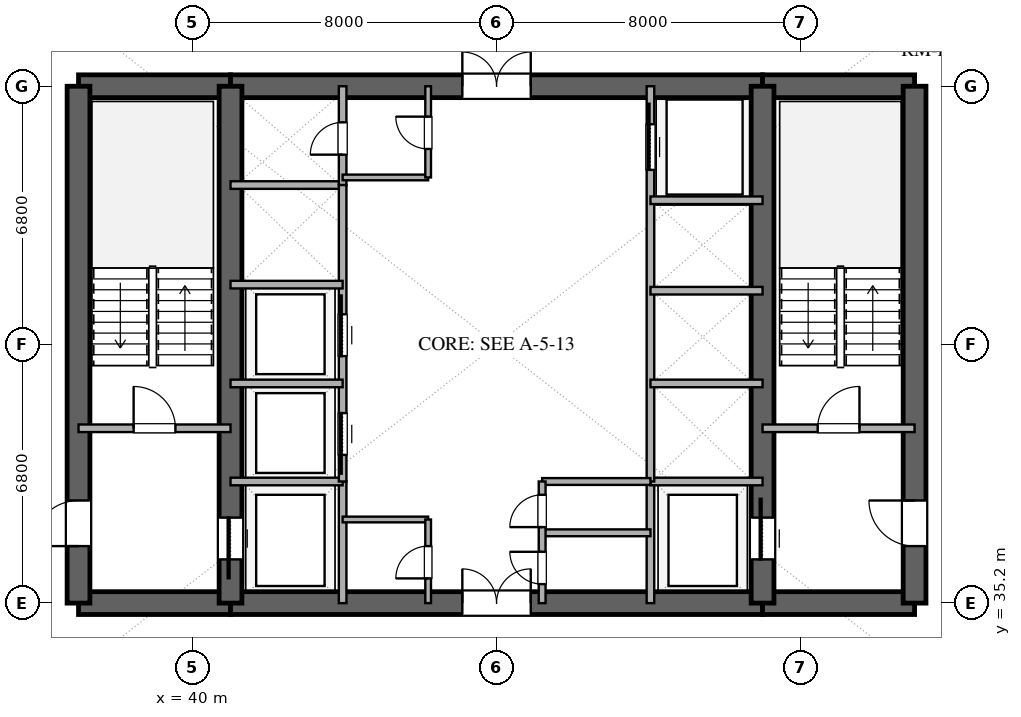
"""IFC4 building model, lengths in metres.
Left out: names, types, materials, properties, quantities, classifications, styles, units other than length and angle.
Written with IfcOpenShell. Run it as: python <this file> out.ifc"""

import sys

from ifc_helpers import new_model, si_unit, direction, frame, frame_2d, origin, place, context, subcontext, project, spatial, rectangle, extrude, element, fill, save


model = new_model("IFC4")
c1 = context("Model", 3, precision=1e-05, world=origin(), true_north=direction((0.0, 1.0)))
c2 = subcontext(c1, "Body", "Model", "MODEL_VIEW")
j1 = project(units=[si_unit("LENGTHUNIT", "METRE"), si_unit("PLANEANGLEUNIT", "RADIAN")], contexts=[c1])
p1 = place(None, origin())
s1 = spatial("IfcSite", under=j1, at=p1, CompositionType="ELEMENT")
p2 = place(p1, origin())
s2 = spatial("IfcBuilding", under=s1, at=p2, CompositionType="ELEMENT")
p3 = place(p2, frame((0.0, 0.0, 64.2)))
s3 = spatial("IfcBuildingStorey", under=s2, at=p3, CompositionType="ELEMENT", Elevation=64.2)
p4 = place(p3, frame((37.0, 35.2, 0.0), z_axis=(0.0, 0.0, 1.0), x_axis=(1.0, 0.0, 0.0)))
e1 = element("IfcWall", 1, at=p4, inside=s3, PredefinedType="SHEAR", context=c2, shape_type="SweptSolid", body=[
    extrude(rectangle(XDim=4.0, YDim=0.6, at=frame_2d((2.0, 0.0))), origin(), (0.0, 0.0, 1.0), 3.38),
])
p5 = place(p3, frame((41.0, 35.2, 0.0), z_axis=(0.0, 0.0, 1.0), x_axis=(1.0, 0.0, 0.0)))
e2 = element("IfcWall", 2, at=p5, inside=s3, PredefinedType="SHEAR", context=c2, shape_type="SweptSolid", body=[
    extrude(rectangle(XDim=14.0, YDim=0.6, at=frame_2d((7.0, 0.0))), origin(), (0.0, 0.0, 1.0), 3.38),
])
p6 = place(p5, frame((6.1, 0.0, 0.0)))
e3 = element("IfcOpeningElement", 3, at=p6, cuts=e2, PredefinedType="OPENING", context=c2, shape_type="SweptSolid", body=[
    extrude(rectangle(XDim=1.8, YDim=2.25, at=frame_2d((0.9, 1.125))), frame((0.0, 0.31, 0.0), z_axis=(0.0, -1.0, 0.0), x_axis=(1.0, 0.0, 0.0)), (0.0, 0.0, 1.0), 0.62),
])
for number, where, z_axis, x_axis in (
    (4, (55.0, 35.2, 0.0), (0.0, 0.0, 1.0), (1.0, 0.0, 0.0)),
    (5, (37.0, 48.8, 0.0), (0.0, 0.0, 1.0), (1.0, 0.0, 0.0)),
):
    element("IfcWall", number, at=place(p3, frame(where, z_axis=z_axis, x_axis=x_axis)), inside=s3, PredefinedType="SHEAR", context=c2, shape_type="SweptSolid", body=[
        extrude(rectangle(XDim=4.0, YDim=0.6, at=frame_2d((2.0, 0.0))), origin(), (0.0, 0.0, 1.0), 3.38),
    ])
p7 = place(p3, frame((41.0, 48.8, 0.0), z_axis=(0.0, 0.0, 1.0), x_axis=(1.0, 0.0, 0.0)))
e6 = element("IfcWall", 6, at=p7, inside=s3, PredefinedType="SHEAR", context=c2, shape_type="SweptSolid", body=[
    extrude(rectangle(XDim=14.0, YDim=0.6, at=frame_2d((7.0, 0.0))), origin(), (0.0, 0.0, 1.0), 3.38),
])
p8 = place(p7, frame((6.1, 0.0, 0.0)))
e7 = element("IfcOpeningElement", 7, at=p8, cuts=e6, PredefinedType="OPENING", context=c2, shape_type="SweptSolid", body=[
    extrude(rectangle(XDim=1.8, YDim=2.25, at=frame_2d((0.9, 1.125))), frame((0.0, 0.31, 0.0), z_axis=(0.0, -1.0, 0.0), x_axis=(1.0, 0.0, 0.0)), (0.0, 0.0, 1.0), 0.62),
])
p9 = place(p3, frame((55.0, 48.8, 0.0), z_axis=(0.0, 0.0, 1.0), x_axis=(1.0, 0.0, 0.0)))
e8 = element("IfcWall", 8, at=p9, inside=s3, PredefinedType="SHEAR", context=c2, shape_type="SweptSolid", body=[
    extrude(rectangle(XDim=4.0, YDim=0.6, at=frame_2d((2.0, 0.0))), origin(), (0.0, 0.0, 1.0), 3.38),
])
p10 = place(p3, frame((37.0, 35.2, 0.0), z_axis=(0.0, 0.0, 1.0), x_axis=(0.0, 1.0, 0.0)))
e9 = element("IfcWall", 9, at=p10, inside=s3, PredefinedType="SHEAR", context=c2, shape_type="SweptSolid", body=[
    extrude(rectangle(XDim=13.6, YDim=0.6, at=frame_2d((6.8, 0.0))), origin(), (0.0, 0.0, 1.0), 3.38),
])
p11 = place(p10, frame((1.5, 0.0, 0.0)))
e10 = element("IfcOpeningElement", 10, at=p11, cuts=e9, PredefinedType="OPENING", context=c2, shape_type="SweptSolid", body=[
    extrude(rectangle(XDim=1.2, YDim=2.15, at=frame_2d((0.6, 1.075))), frame((0.0, 0.31, 0.0), z_axis=(0.0, -1.0, 0.0), x_axis=(1.0, 0.0, 0.0)), (0.0, 0.0, 1.0), 0.62),
])
p12 = place(p3, frame((59.0, 35.2, 0.0), z_axis=(0.0, 0.0, 1.0), x_axis=(0.0, 1.0, 0.0)))
e11 = element("IfcWall", 11, at=p12, inside=s3, PredefinedType="SHEAR", context=c2, shape_type="SweptSolid", body=[
    extrude(rectangle(XDim=13.6, YDim=0.6, at=frame_2d((6.8, 0.0))), origin(), (0.0, 0.0, 1.0), 3.38),
])
p13 = place(p12, frame((1.5, 0.0, 0.0)))
e12 = element("IfcOpeningElement", 12, at=p13, cuts=e11, PredefinedType="OPENING", context=c2, shape_type="SweptSolid", body=[
    extrude(rectangle(XDim=1.2, YDim=2.15, at=frame_2d((0.6, 1.075))), frame((0.0, 0.31, 0.0), z_axis=(0.0, -1.0, 0.0), x_axis=(1.0, 0.0, 0.0)), (0.0, 0.0, 1.0), 0.62),
])
p14 = place(p3, frame((41.0, 35.2, 0.0), z_axis=(0.0, 0.0, 1.0), x_axis=(0.0, 1.0, 0.0)))
e13 = element("IfcWall", 13, at=p14, inside=s3, PredefinedType="SHEAR", context=c2, shape_type="SweptSolid", body=[
    extrude(rectangle(XDim=13.6, YDim=0.6, at=frame_2d((6.8, 0.0))), origin(), (0.0, 0.0, 1.0), 3.38),
])
p15 = place(p14, frame((1.15, 0.0, 0.0)))
e14 = element("IfcOpeningElement", 14, at=p15, cuts=e13, PredefinedType="OPENING", context=c2, shape_type="SweptSolid", body=[
    extrude(rectangle(XDim=1.1, YDim=2.2, at=frame_2d((0.55, 1.1))), frame((0.0, 0.31, 0.0), z_axis=(0.0, -1.0, 0.0), x_axis=(1.0, 0.0, 0.0)), (0.0, 0.0, 1.0), 0.62),
])
p16 = place(p3, frame((55.0, 35.2, 0.0), z_axis=(0.0, 0.0, 1.0), x_axis=(0.0, 1.0, 0.0)))
e15 = element("IfcWall", 15, at=p16, inside=s3, PredefinedType="SHEAR", context=c2, shape_type="SweptSolid", body=[
    extrude(rectangle(XDim=13.6, YDim=0.6, at=frame_2d((6.8, 0.0))), origin(), (0.0, 0.0, 1.0), 3.38),
])
p17 = place(p16, frame((1.15, 0.0, 0.0)))
e16 = element("IfcOpeningElement", 16, at=p17, cuts=e15, PredefinedType="OPENING", context=c2, shape_type="SweptSolid", body=[
    extrude(rectangle(XDim=1.1, YDim=2.2, at=frame_2d((0.55, 1.1))), frame((0.0, 0.31, 0.0), z_axis=(0.0, -1.0, 0.0), x_axis=(1.0, 0.0, 0.0)), (0.0, 0.0, 1.0), 0.62),
])
p18 = place(p3, frame((37.0, 39.8, 0.0), z_axis=(0.0, 0.0, 1.0), x_axis=(1.0, 0.0, 0.0)))
e17 = element("IfcWall", 17, at=p18, inside=s3, PredefinedType="SOLIDWALL", context=c2, shape_type="SweptSolid", body=[
    extrude(rectangle(XDim=4.0, YDim=0.2, at=frame_2d((2.0, 0.0))), origin(), (0.0, 0.0, 1.0), 2.74),
])
p19 = place(p18, frame((1.45, 0.0, 0.0)))
e18 = element("IfcOpeningElement", 18, at=p19, cuts=e17, PredefinedType="OPENING", context=c2, shape_type="SweptSolid", body=[
    extrude(rectangle(XDim=1.1, YDim=2.15, at=frame_2d((0.55, 1.075))), frame((0.0, 0.11, 0.0), z_axis=(0.0, -1.0, 0.0), x_axis=(1.0, 0.0, 0.0)), (0.0, 0.0, 1.0), 0.22),
])
p20 = place(p3, frame((55.0, 39.8, 0.0), z_axis=(0.0, 0.0, 1.0), x_axis=(1.0, 0.0, 0.0)))
e19 = element("IfcWall", 19, at=p20, inside=s3, PredefinedType="SOLIDWALL", context=c2, shape_type="SweptSolid", body=[
    extrude(rectangle(XDim=4.0, YDim=0.2, at=frame_2d((2.0, 0.0))), origin(), (0.0, 0.0, 1.0), 2.74),
])
p21 = place(p20, frame((1.45, 0.0, 0.0)))
e20 = element("IfcOpeningElement", 20, at=p21, cuts=e19, PredefinedType="OPENING", context=c2, shape_type="SweptSolid", body=[
    extrude(rectangle(XDim=1.1, YDim=2.15, at=frame_2d((0.55, 1.075))), frame((0.0, 0.11, 0.0), z_axis=(0.0, -1.0, 0.0), x_axis=(1.0, 0.0, 0.0)), (0.0, 0.0, 1.0), 0.22),
])
p22 = place(p3, frame((43.95, 35.2, 0.0), z_axis=(0.0, 0.0, 1.0), x_axis=(0.0, 1.0, 0.0)))
e21 = element("IfcWall", 21, at=p22, inside=s3, PredefinedType="SOLIDWALL", context=c2, shape_type="SweptSolid", body=[
    extrude(rectangle(XDim=3.2, YDim=0.2, at=frame_2d((1.6, 0.0))), origin(), (0.0, 0.0, 1.0), 2.74),
])
p23 = place(p3, frame((41.0, 38.4, 0.0), z_axis=(0.0, 0.0, 1.0), x_axis=(1.0, 0.0, 0.0)))
e22 = element("IfcWall", 22, at=p23, inside=s3, PredefinedType="SOLIDWALL", context=c2, shape_type="SweptSolid", body=[
    extrude(rectangle(XDim=2.95, YDim=0.2, at=frame_2d((1.475, 0.0))), origin(), (0.0, 0.0, 1.0), 2.74),
])
p24 = place(p3, frame((52.05, 35.2, 0.0), z_axis=(0.0, 0.0, 1.0), x_axis=(0.0, 1.0, 0.0)))
e23 = element("IfcWall", 23, at=p24, inside=s3, PredefinedType="SOLIDWALL", context=c2, shape_type="SweptSolid", body=[
    extrude(rectangle(XDim=3.2, YDim=0.2, at=frame_2d((1.6, 0.0))), origin(), (0.0, 0.0, 1.0), 2.74),
])
for number, where, z_axis, x_axis in (
    (24, (52.05, 38.4, 0.0), (0.0, 0.0, 1.0), (1.0, 0.0, 0.0)),
    (25, (41.0, 46.2, 0.0), (0.0, 0.0, 1.0), (1.0, 0.0, 0.0)),
):
    element("IfcWall", number, at=place(p3, frame(where, z_axis=z_axis, x_axis=x_axis)), inside=s3, PredefinedType="SOLIDWALL", context=c2, shape_type="SweptSolid", body=[
        extrude(rectangle(XDim=2.95, YDim=0.2, at=frame_2d((1.475, 0.0))), origin(), (0.0, 0.0, 1.0), 2.74),
    ])
p25 = place(p3, frame((43.95, 46.2, 0.0), z_axis=(0.0, 0.0, 1.0), x_axis=(0.0, 1.0, 0.0)))
e26 = element("IfcWall", 26, at=p25, inside=s3, PredefinedType="SOLIDWALL", context=c2, shape_type="SweptSolid", body=[
    extrude(rectangle(XDim=2.6, YDim=0.2, at=frame_2d((1.3, 0.0))), origin(), (0.0, 0.0, 1.0), 2.74),
])
p26 = place(p25, frame((0.8, 0.0, 0.0)))
e27 = element("IfcOpeningElement", 27, at=p26, cuts=e26, PredefinedType="OPENING", context=c2, shape_type="SweptSolid", body=[
    extrude(rectangle(XDim=0.85, YDim=2.15, at=frame_2d((0.425, 1.075))), frame((0.0, 0.11, 0.0), z_axis=(0.0, -1.0, 0.0), x_axis=(1.0, 0.0, 0.0)), (0.0, 0.0, 1.0), 0.22),
])
p27 = place(p3, frame((43.95, 38.4, 0.0), z_axis=(0.0, 0.0, 1.0), x_axis=(0.0, 1.0, 0.0)))
e28 = element("IfcWall", 28, at=p27, inside=s3, PredefinedType="SOLIDWALL", context=c2, shape_type="SweptSolid", body=[
    extrude(rectangle(XDim=7.8, YDim=0.2, at=frame_2d((3.9, 0.0))), origin(), (0.0, 0.0, 1.0), 2.74),
])
p28 = place(p27, frame((0.7, 0.0, 0.0)))
e29 = element("IfcOpeningElement", 29, at=p28, cuts=e28, PredefinedType="OPENING", context=c2, shape_type="SweptSolid", body=[
    extrude(rectangle(XDim=1.1, YDim=2.2, at=frame_2d((0.55, 1.1))), frame((0.0, 0.11, 0.0), z_axis=(0.0, -1.0, 0.0), x_axis=(1.0, 0.0, 0.0)), (0.0, 0.0, 1.0), 0.22),
])
p29 = place(p27, frame((3.3, 0.0, 0.0)))
e30 = element("IfcOpeningElement", 30, at=p29, cuts=e28, PredefinedType="OPENING", context=c2, shape_type="SweptSolid", body=[
    extrude(rectangle(XDim=1.1, YDim=2.2, at=frame_2d((0.55, 1.1))), frame((0.0, 0.11, 0.0), z_axis=(0.0, -1.0, 0.0), x_axis=(1.0, 0.0, 0.0)), (0.0, 0.0, 1.0), 0.22),
])
for number, where, z_axis, x_axis in (
    (31, (41.0, 40.98, 0.0), (0.0, 0.0, 1.0), (1.0, 0.0, 0.0)),
    (32, (41.0, 43.58, 0.0), (0.0, 0.0, 1.0), (1.0, 0.0, 0.0)),
):
    element("IfcWall", number, at=place(p3, frame(where, z_axis=z_axis, x_axis=x_axis)), inside=s3, PredefinedType="SOLIDWALL", context=c2, shape_type="SweptSolid", body=[
        extrude(rectangle(XDim=2.95, YDim=0.2, at=frame_2d((1.475, 0.0))), origin(), (0.0, 0.0, 1.0), 2.74),
    ])
p30 = place(p3, frame((52.05, 38.4, 0.0), z_axis=(0.0, 0.0, 1.0), x_axis=(0.0, 1.0, 0.0)))
e33 = element("IfcWall", 33, at=p30, inside=s3, PredefinedType="SOLIDWALL", context=c2, shape_type="SweptSolid", body=[
    extrude(rectangle(XDim=10.4, YDim=0.2, at=frame_2d((5.2, 0.0))), origin(), (0.0, 0.0, 1.0), 2.74),
])
p31 = place(p30, frame((8.2, 0.0, 0.0)))
e34 = element("IfcOpeningElement", 34, at=p31, cuts=e33, PredefinedType="OPENING", context=c2, shape_type="SweptSolid", body=[
    extrude(rectangle(XDim=1.2, YDim=2.2, at=frame_2d((0.6, 1.1))), frame((0.0, 0.11, 0.0), z_axis=(0.0, -1.0, 0.0), x_axis=(1.0, 0.0, 0.0)), (0.0, 0.0, 1.0), 0.22),
])
for number, where, z_axis, x_axis in (
    (35, (52.05, 40.98, 0.0), (0.0, 0.0, 1.0), (1.0, 0.0, 0.0)),
    (36, (52.05, 43.42, 0.0), (0.0, 0.0, 1.0), (1.0, 0.0, 0.0)),
    (37, (52.05, 45.8, 0.0), (0.0, 0.0, 1.0), (1.0, 0.0, 0.0)),
):
    element("IfcWall", number, at=place(p3, frame(where, z_axis=z_axis, x_axis=x_axis)), inside=s3, PredefinedType="SOLIDWALL", context=c2, shape_type="SweptSolid", body=[
        extrude(rectangle(XDim=2.95, YDim=0.2, at=frame_2d((1.475, 0.0))), origin(), (0.0, 0.0, 1.0), 2.74),
    ])
p32 = place(p3, frame((43.95, 37.4, 0.0), z_axis=(0.0, 0.0, 1.0), x_axis=(1.0, 0.0, 0.0)))
e38 = element("IfcWall", 38, at=p32, inside=s3, PredefinedType="PARTITIONING", context=c2, shape_type="SweptSolid", body=[
    extrude(rectangle(XDim=2.25, YDim=0.15, at=frame_2d((1.125, 0.0))), origin(), (0.0, 0.0, 1.0), 2.74),
])
p33 = place(p3, frame((46.2, 35.2, 0.0), z_axis=(0.0, 0.0, 1.0), x_axis=(0.0, 1.0, 0.0)))
e39 = element("IfcWall", 39, at=p33, inside=s3, PredefinedType="PARTITIONING", context=c2, shape_type="SweptSolid", body=[
    extrude(rectangle(XDim=2.2, YDim=0.15, at=frame_2d((1.1, 0.0))), origin(), (0.0, 0.0, 1.0), 2.74),
])
p34 = place(p33, frame((0.65, 0.0, 0.0)))
e40 = element("IfcOpeningElement", 40, at=p34, cuts=e39, PredefinedType="OPENING", context=c2, shape_type="SweptSolid", body=[
    extrude(rectangle(XDim=0.85, YDim=2.15, at=frame_2d((0.425, 1.075))), frame((0.0, 0.085, 0.0), z_axis=(0.0, -1.0, 0.0), x_axis=(1.0, 0.0, 0.0)), (0.0, 0.0, 1.0), 0.17),
])
p35 = place(p3, frame((43.95, 46.4, 0.0), z_axis=(0.0, 0.0, 1.0), x_axis=(1.0, 0.0, 0.0)))
e41 = element("IfcWall", 41, at=p35, inside=s3, PredefinedType="PARTITIONING", context=c2, shape_type="SweptSolid", body=[
    extrude(rectangle(XDim=2.25, YDim=0.15, at=frame_2d((1.125, 0.0))), origin(), (0.0, 0.0, 1.0), 2.74),
])
p36 = place(p3, frame((46.2, 46.4, 0.0), z_axis=(0.0, 0.0, 1.0), x_axis=(0.0, 1.0, 0.0)))
e42 = element("IfcWall", 42, at=p36, inside=s3, PredefinedType="PARTITIONING", context=c2, shape_type="SweptSolid", body=[
    extrude(rectangle(XDim=2.4, YDim=0.15, at=frame_2d((1.2, 0.0))), origin(), (0.0, 0.0, 1.0), 2.74),
])
p37 = place(p36, frame((0.75, 0.0, 0.0)))
e43 = element("IfcOpeningElement", 43, at=p37, cuts=e42, PredefinedType="OPENING", context=c2, shape_type="SweptSolid", body=[
    extrude(rectangle(XDim=0.85, YDim=2.15, at=frame_2d((0.425, 1.075))), frame((0.0, 0.085, 0.0), z_axis=(0.0, -1.0, 0.0), x_axis=(1.0, 0.0, 0.0)), (0.0, 0.0, 1.0), 0.17),
])
for number, where, z_axis, x_axis in (
    (44, (49.2, 37.05, 0.0), (0.0, 0.0, 1.0), (1.0, 0.0, 0.0)),
    (45, (49.2, 38.4, 0.0), (0.0, 0.0, 1.0), (1.0, 0.0, 0.0)),
):
    element("IfcWall", number, at=place(p3, frame(where, z_axis=z_axis, x_axis=x_axis)), inside=s3, PredefinedType="PLUMBINGWALL", context=c2, shape_type="SweptSolid", body=[
        extrude(rectangle(XDim=2.85, YDim=0.18, at=frame_2d((1.425, 0.0))), origin(), (0.0, 0.0, 1.0), 2.74),
    ])
p38 = place(p3, frame((49.2, 35.2, 0.0), z_axis=(0.0, 0.0, 1.0), x_axis=(0.0, 1.0, 0.0)))
e46 = element("IfcWall", 46, at=p38, inside=s3, PredefinedType="PLUMBINGWALL", context=c2, shape_type="SweptSolid", body=[
    extrude(rectangle(XDim=3.2, YDim=0.18, at=frame_2d((1.6, 0.0))), origin(), (0.0, 0.0, 1.0), 2.74),
])
p39 = place(p38, frame((0.5, 0.0, 0.0)))
e47 = element("IfcOpeningElement", 47, at=p39, cuts=e46, PredefinedType="OPENING", context=c2, shape_type="SweptSolid", body=[
    extrude(rectangle(XDim=0.85, YDim=2.1, at=frame_2d((0.425, 1.05))), frame((0.0, 0.1, 0.0), z_axis=(0.0, -1.0, 0.0), x_axis=(1.0, 0.0, 0.0)), (0.0, 0.0, 1.0), 0.2),
])
p40 = place(p38, frame((2.0, 0.0, 0.0)))
e48 = element("IfcOpeningElement", 48, at=p40, cuts=e46, PredefinedType="OPENING", context=c2, shape_type="SweptSolid", body=[
    extrude(rectangle(XDim=0.85, YDim=2.15, at=frame_2d((0.425, 1.075))), frame((0.0, 0.1, 0.0), z_axis=(0.0, -1.0, 0.0), x_axis=(1.0, 0.0, 0.0)), (0.0, 0.0, 1.0), 0.2),
])
p41 = place(p15, origin())
e49 = element("IfcDoor", 49, at=p41, inside=s3, OperationType="SLIDING_TO_LEFT", PredefinedType="DOOR", context=c2, shape_type="SweptSolid", body=[
    extrude(rectangle(XDim=1.1, YDim=2.2, at=frame_2d((0.55, 1.1))), frame((0.0, 0.025, 0.0), z_axis=(0.0, -1.0, 0.0), x_axis=(1.0, 0.0, 0.0)), (0.0, 0.0, 1.0), 0.05),
])
fill(e14, e49)
p42 = place(p17, origin())
e50 = element("IfcDoor", 50, at=p42, inside=s3, OperationType="SLIDING_TO_RIGHT", PredefinedType="DOOR", context=c2, shape_type="SweptSolid", body=[
    extrude(rectangle(XDim=1.1, YDim=2.2, at=frame_2d((0.55, 1.1))), frame((0.0, 0.025, 0.0), z_axis=(0.0, -1.0, 0.0), x_axis=(1.0, 0.0, 0.0)), (0.0, 0.0, 1.0), 0.05),
])
fill(e16, e50)
p43 = place(p11, origin())
e51 = element("IfcDoor", 51, at=p43, inside=s3, OperationType="SINGLE_SWING_LEFT", PredefinedType="DOOR", context=c2, shape_type="SweptSolid", body=[
    extrude(rectangle(XDim=1.2, YDim=2.15, at=frame_2d((0.6, 1.075))), frame((0.0, 0.025, 0.0), z_axis=(0.0, -1.0, 0.0), x_axis=(1.0, 0.0, 0.0)), (0.0, 0.0, 1.0), 0.05),
])
fill(e10, e51)
p44 = place(p13, origin())
e52 = element("IfcDoor", 52, at=p44, inside=s3, OperationType="SINGLE_SWING_RIGHT", PredefinedType="DOOR", context=c2, shape_type="SweptSolid", body=[
    extrude(rectangle(XDim=1.2, YDim=2.15, at=frame_2d((0.6, 1.075))), frame((0.0, 0.025, 0.0), z_axis=(0.0, -1.0, 0.0), x_axis=(1.0, 0.0, 0.0)), (0.0, 0.0, 1.0), 0.05),
])
fill(e12, e52)
p45 = place(p6, origin())
e53 = element("IfcDoor", 53, at=p45, inside=s3, OperationType="DOUBLE_DOOR_SINGLE_SWING", PredefinedType="DOOR", context=c2, shape_type="SweptSolid", body=[
    extrude(rectangle(XDim=1.8, YDim=2.25, at=frame_2d((0.9, 1.125))), frame((0.0, 0.025, 0.0), z_axis=(0.0, -1.0, 0.0), x_axis=(1.0, 0.0, 0.0)), (0.0, 0.0, 1.0), 0.05),
])
fill(e3, e53)
p46 = place(p8, origin())
e54 = element("IfcDoor", 54, at=p46, inside=s3, OperationType="DOUBLE_DOOR_SINGLE_SWING", PredefinedType="DOOR", context=c2, shape_type="SweptSolid", body=[
    extrude(rectangle(XDim=1.8, YDim=2.25, at=frame_2d((0.9, 1.125))), frame((0.0, 0.025, 0.0), z_axis=(0.0, -1.0, 0.0), x_axis=(1.0, 0.0, 0.0)), (0.0, 0.0, 1.0), 0.05),
])
fill(e7, e54)
p47 = place(p19, origin())
e55 = element("IfcDoor", 55, at=p47, inside=s3, OperationType="SINGLE_SWING_LEFT", PredefinedType="DOOR", context=c2, shape_type="SweptSolid", body=[
    extrude(rectangle(XDim=1.1, YDim=2.15, at=frame_2d((0.55, 1.075))), frame((0.0, 0.025, 0.0), z_axis=(0.0, -1.0, 0.0), x_axis=(1.0, 0.0, 0.0)), (0.0, 0.0, 1.0), 0.05),
])
fill(e18, e55)
p48 = place(p21, origin())
e56 = element("IfcDoor", 56, at=p48, inside=s3, OperationType="SINGLE_SWING_RIGHT", PredefinedType="DOOR", context=c2, shape_type="SweptSolid", body=[
    extrude(rectangle(XDim=1.1, YDim=2.15, at=frame_2d((0.55, 1.075))), frame((0.0, 0.025, 0.0), z_axis=(0.0, -1.0, 0.0), x_axis=(1.0, 0.0, 0.0)), (0.0, 0.0, 1.0), 0.05),
])
fill(e20, e56)
p49 = place(p26, origin())
e57 = element("IfcDoor", 57, at=p49, inside=s3, OperationType="SINGLE_SWING_LEFT", PredefinedType="DOOR", context=c2, shape_type="SweptSolid", body=[
    extrude(rectangle(XDim=0.85, YDim=2.15, at=frame_2d((0.425, 1.075))), frame((0.0, 0.025, 0.0), z_axis=(0.0, -1.0, 0.0), x_axis=(1.0, 0.0, 0.0)), (0.0, 0.0, 1.0), 0.05),
])
fill(e27, e57)
p50 = place(p28, origin())
e58 = element("IfcDoor", 58, at=p50, inside=s3, OperationType="SLIDING_TO_LEFT", PredefinedType="DOOR", context=c2, shape_type="SweptSolid", body=[
    extrude(rectangle(XDim=1.1, YDim=2.2, at=frame_2d((0.55, 1.1))), frame((0.0, 0.025, 0.0), z_axis=(0.0, -1.0, 0.0), x_axis=(1.0, 0.0, 0.0)), (0.0, 0.0, 1.0), 0.05),
])
fill(e29, e58)
p51 = place(p29, origin())
e59 = element("IfcDoor", 59, at=p51, inside=s3, OperationType="SLIDING_TO_RIGHT", PredefinedType="DOOR", context=c2, shape_type="SweptSolid", body=[
    extrude(rectangle(XDim=1.1, YDim=2.2, at=frame_2d((0.55, 1.1))), frame((0.0, 0.025, 0.0), z_axis=(0.0, -1.0, 0.0), x_axis=(1.0, 0.0, 0.0)), (0.0, 0.0, 1.0), 0.05),
])
fill(e30, e59)
p52 = place(p31, origin())
e60 = element("IfcDoor", 60, at=p52, inside=s3, OperationType="SLIDING_TO_RIGHT", PredefinedType="DOOR", context=c2, shape_type="SweptSolid", body=[
    extrude(rectangle(XDim=1.2, YDim=2.2, at=frame_2d((0.6, 1.1))), frame((0.0, 0.025, 0.0), z_axis=(0.0, -1.0, 0.0), x_axis=(1.0, 0.0, 0.0)), (0.0, 0.0, 1.0), 0.05),
])
fill(e34, e60)
p53 = place(p34, origin())
e61 = element("IfcDoor", 61, at=p53, inside=s3, OperationType="SINGLE_SWING_LEFT", PredefinedType="DOOR", context=c2, shape_type="SweptSolid", body=[
    extrude(rectangle(XDim=0.85, YDim=2.15, at=frame_2d((0.425, 1.075))), frame((0.0, 0.025, 0.0), z_axis=(0.0, -1.0, 0.0), x_axis=(1.0, 0.0, 0.0)), (0.0, 0.0, 1.0), 0.05),
])
fill(e40, e61)
p54 = place(p37, origin())
e62 = element("IfcDoor", 62, at=p54, inside=s3, OperationType="SINGLE_SWING_RIGHT", PredefinedType="DOOR", context=c2, shape_type="SweptSolid", body=[
    extrude(rectangle(XDim=0.85, YDim=2.15, at=frame_2d((0.425, 1.075))), frame((0.0, 0.025, 0.0), z_axis=(0.0, -1.0, 0.0), x_axis=(1.0, 0.0, 0.0)), (0.0, 0.0, 1.0), 0.05),
])
fill(e43, e62)
p55 = place(p39, origin())
e63 = element("IfcDoor", 63, at=p55, inside=s3, OperationType="SINGLE_SWING_RIGHT", PredefinedType="DOOR", context=c2, shape_type="SweptSolid", body=[
    extrude(rectangle(XDim=0.85, YDim=2.1, at=frame_2d((0.425, 1.05))), frame((0.0, 0.025, 0.0), z_axis=(0.0, -1.0, 0.0), x_axis=(1.0, 0.0, 0.0)), (0.0, 0.0, 1.0), 0.05),
])
fill(e47, e63)
p56 = place(p40, origin())
e64 = element("IfcDoor", 64, at=p56, inside=s3, OperationType="SINGLE_SWING_LEFT", PredefinedType="DOOR", context=c2, shape_type="SweptSolid", body=[
    extrude(rectangle(XDim=0.85, YDim=2.15, at=frame_2d((0.425, 1.075))), frame((0.0, 0.025, 0.0), z_axis=(0.0, -1.0, 0.0), x_axis=(1.0, 0.0, 0.0)), (0.0, 0.0, 1.0), 0.05),
])
fill(e48, e64)
save(model, sys.argv[1])
